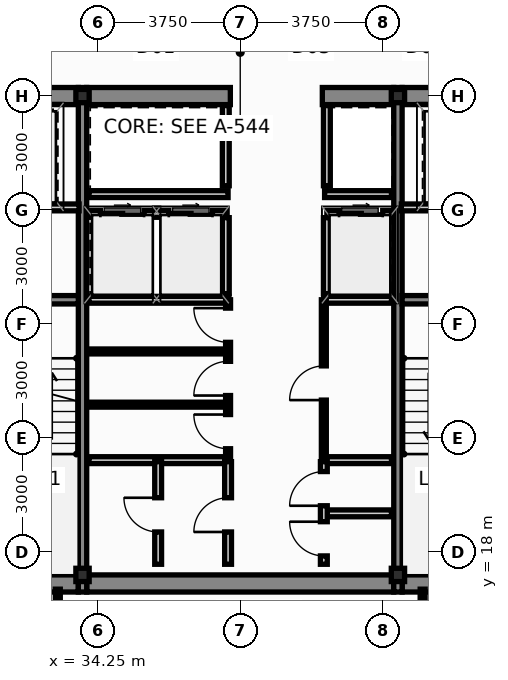
"""IFC4 building model, lengths in metres.
Left out: names, types, materials, properties, quantities, classifications, styles, units other than length and angle.
Written with IfcOpenShell. Run it as: python <this file> out.ifc"""

import sys

from ifc_helpers import new_model, si_unit, direction, frame, frame_2d, origin, origin_2d, place, context, subcontext, project, spatial, rectangle, hollow_rectangle, extrude, source, transform, mapped, element, fill, save


model = new_model("IFC4")
c1 = context("Model", 3, precision=1e-05, world=origin(), true_north=direction((0.0, 1.0)))
c2 = subcontext(c1, "Body", "Model", "MODEL_VIEW")
j1 = project(units=[si_unit("LENGTHUNIT", "METRE"), si_unit("PLANEANGLEUNIT", "RADIAN")], contexts=[c1])
p1 = place(None, origin())
s1 = spatial("IfcSite", under=j1, at=p1, CompositionType="ELEMENT")
p2 = place(p1, origin())
s2 = spatial("IfcBuilding", under=s1, at=p2, CompositionType="ELEMENT")
p3 = place(p2, frame((0.0, 0.0, 205.95)))
s3 = spatial("IfcBuildingStorey", under=s2, at=p3, CompositionType="ELEMENT", Elevation=205.95)
m1 = source(origin(), c2, "Body", "SweptSolid", [
    extrude(hollow_rectangle(XDim=0.35, YDim=0.35, WallThickness=0.016, at=origin_2d()), origin(), (0.0, 0.0, 1.0), 3.65),
])
for number, where, z_axis, x_axis in (
    (1, (33.85, 17.4, 0.0), (0.0, 0.0, 1.0), (1.0, 0.0, 0.0)),
    (2, (42.15, 17.4, 0.0), (0.0, 0.0, 1.0), (1.0, 0.0, 0.0)),
    (3, (33.85, 30.0, 0.0), (0.0, 0.0, 1.0), (1.0, 0.0, 0.0)),
    (4, (42.15, 30.0, 0.0), (0.0, 0.0, 1.0), (1.0, 0.0, 0.0)),
):
    element("IfcColumn", number, at=place(p3, frame(where, z_axis=z_axis, x_axis=x_axis)), inside=s3, PredefinedType="COLUMN", context=c2, shape_type="MappedRepresentation", body=[
        mapped(m1, transform((0.0, 0.0, 0.0), scale=1.0)),
    ])
p4 = place(p3, frame((30.84, 17.175, 0.0), z_axis=(0.0, 0.0, 1.0), x_axis=(1.0, 0.0, 0.0)))
e5 = element("IfcWall", 5, at=p4, inside=s3, PredefinedType="SHEAR", context=c2, shape_type="SweptSolid", body=[
    extrude(rectangle(XDim=2.9, YDim=0.45, at=frame_2d((1.45, 0.0))), origin(), (0.0, 0.0, 1.0), 3.65),
])
p5 = place(p3, frame((33.96, 17.175, 0.0), z_axis=(0.0, 0.0, 1.0), x_axis=(1.0, 0.0, 0.0)))
e6 = element("IfcWall", 6, at=p5, inside=s3, PredefinedType="SHEAR", context=c2, shape_type="SweptSolid", body=[
    extrude(rectangle(XDim=8.08, YDim=0.45, at=frame_2d((4.04, 0.0))), origin(), (0.0, 0.0, 1.0), 3.65),
])
for number, where, z_axis, x_axis in (
    (7, (42.26, 17.175, 0.0), (0.0, 0.0, 1.0), (1.0, 0.0, 0.0)),
    (8, (30.84, 30.0, 0.0), (0.0, 0.0, 1.0), (1.0, 0.0, 0.0)),
):
    element("IfcWall", number, at=place(p3, frame(where, z_axis=z_axis, x_axis=x_axis)), inside=s3, PredefinedType="SHEAR", context=c2, shape_type="SweptSolid", body=[
        extrude(rectangle(XDim=2.9, YDim=0.45, at=frame_2d((1.45, 0.0))), origin(), (0.0, 0.0, 1.0), 3.65),
    ])
p6 = place(p3, frame((33.96, 30.0, 0.0), z_axis=(0.0, 0.0, 1.0), x_axis=(1.0, 0.0, 0.0)))
e9 = element("IfcWall", 9, at=p6, inside=s3, PredefinedType="SHEAR", context=c2, shape_type="SweptSolid", body=[
    extrude(rectangle(XDim=3.78, YDim=0.45, at=frame_2d((1.89, 0.0))), origin(), (0.0, 0.0, 1.0), 3.65),
])
p7 = place(p3, frame((40.16, 30.0, 0.0), z_axis=(0.0, 0.0, 1.0), x_axis=(1.0, 0.0, 0.0)))
e10 = element("IfcWall", 10, at=p7, inside=s3, PredefinedType="SHEAR", context=c2, shape_type="SweptSolid", body=[
    extrude(rectangle(XDim=1.88, YDim=0.45, at=frame_2d((0.94, 0.0))), origin(), (0.0, 0.0, 1.0), 3.65),
])
p8 = place(p3, frame((42.26, 30.0, 0.0), z_axis=(0.0, 0.0, 1.0), x_axis=(1.0, 0.0, 0.0)))
e11 = element("IfcWall", 11, at=p8, inside=s3, PredefinedType="SHEAR", context=c2, shape_type="SweptSolid", body=[
    extrude(rectangle(XDim=2.9, YDim=0.45, at=frame_2d((1.45, 0.0))), origin(), (0.0, 0.0, 1.0), 3.65),
])
for number, where, z_axis, x_axis in (
    (12, (33.85, 16.95, 0.0), (0.0, 0.0, 1.0), (0.0, 1.0, 0.0)),
    (13, (42.15, 16.95, 0.0), (0.0, 0.0, 1.0), (0.0, 1.0, 0.0)),
):
    element("IfcWall", number, at=place(p3, frame(where, z_axis=z_axis, x_axis=x_axis)), inside=s3, PredefinedType="SHEAR", context=c2, shape_type="SweptSolid", body=[
        extrude(rectangle(XDim=13.275, YDim=0.22, at=frame_2d((6.638, 0.0))), origin(), (0.0, 0.0, 1.0), 3.65),
    ])
for number, where, z_axis, x_axis in (
    (14, (30.84, 24.64, 0.0), (0.0, 0.0, 1.0), (1.0, 0.0, 0.0)),
    (15, (42.26, 24.64, 0.0), (0.0, 0.0, 1.0), (1.0, 0.0, 0.0)),
):
    element("IfcWall", number, at=place(p3, frame(where, z_axis=z_axis, x_axis=x_axis)), inside=s3, PredefinedType="SHEAR", context=c2, shape_type="SweptSolid", body=[
        extrude(rectangle(XDim=2.9, YDim=0.22, at=frame_2d((1.45, 0.0))), origin(), (0.0, 0.0, 1.0), 3.65),
    ])
p9 = place(p3, frame((34.02, 26.9, 0.0), z_axis=(0.0, 0.0, 1.0), x_axis=(1.0, 0.0, 0.0)))
e16 = element("IfcWall", 16, at=p9, inside=s3, PredefinedType="PARTITIONING", context=c2, shape_type="SweptSolid", body=[
    extrude(rectangle(XDim=3.6, YDim=0.18, at=frame_2d((1.8, 0.0))), origin(), (0.0, 0.0, 1.0), 3.4),
])
p10 = place(p9, frame((0.3, 0.0, 0.0)))
e17 = element("IfcOpeningElement", 17, at=p10, cuts=e16, PredefinedType="OPENING", context=c2, shape_type="SweptSolid", body=[
    extrude(rectangle(XDim=1.15, YDim=2.2, at=frame_2d((0.575, 1.1))), frame((0.0, 0.102, 0.0), z_axis=(0.0, -1.0, 0.0), x_axis=(1.0, 0.0, 0.0)), (0.0, 0.0, 1.0), 0.204),
])
p11 = place(p9, frame((2.1, 0.0, 0.0)))
e18 = element("IfcOpeningElement", 18, at=p11, cuts=e16, PredefinedType="OPENING", context=c2, shape_type="SweptSolid", body=[
    extrude(rectangle(XDim=1.15, YDim=2.2, at=frame_2d((0.575, 1.1))), frame((0.0, 0.102, 0.0), z_axis=(0.0, -1.0, 0.0), x_axis=(1.0, 0.0, 0.0)), (0.0, 0.0, 1.0), 0.204),
])
p12 = place(p3, frame((40.28, 26.9, 0.0), z_axis=(0.0, 0.0, 1.0), x_axis=(1.0, 0.0, 0.0)))
e19 = element("IfcWall", 19, at=p12, inside=s3, PredefinedType="PARTITIONING", context=c2, shape_type="SweptSolid", body=[
    extrude(rectangle(XDim=1.7, YDim=0.18, at=frame_2d((0.85, 0.0))), origin(), (0.0, 0.0, 1.0), 3.4),
])
p13 = place(p12, frame((0.32, 0.0, 0.0)))
e20 = element("IfcOpeningElement", 20, at=p13, cuts=e19, PredefinedType="OPENING", context=c2, shape_type="SweptSolid", body=[
    extrude(rectangle(XDim=1.15, YDim=2.2, at=frame_2d((0.575, 1.1))), frame((0.0, 0.102, 0.0), z_axis=(0.0, -1.0, 0.0), x_axis=(1.0, 0.0, 0.0)), (0.0, 0.0, 1.0), 0.204),
])
for number, where, z_axis, x_axis in (
    (21, (37.62, 24.8, 0.0), (0.0, 0.0, 1.0), (0.0, 1.0, 0.0)),
    (22, (40.28, 24.8, 0.0), (0.0, 0.0, 1.0), (0.0, 1.0, 0.0)),
):
    element("IfcWall", number, at=place(p3, frame(where, z_axis=z_axis, x_axis=x_axis)), inside=s3, PredefinedType="PARTITIONING", context=c2, shape_type="SweptSolid", body=[
        extrude(rectangle(XDim=2.0, YDim=0.18, at=frame_2d((1.0, 0.0))), origin(), (0.0, 0.0, 1.0), 3.4),
    ])
p14 = place(p3, frame((34.02, 24.64, 0.0), z_axis=(0.0, 0.0, 1.0), x_axis=(1.0, 0.0, 0.0)))
e23 = element("IfcWall", 23, at=p14, inside=s3, PredefinedType="PARTITIONING", context=c2, shape_type="SweptSolid", body=[
    extrude(rectangle(XDim=3.68, YDim=0.18, at=frame_2d((1.84, 0.0))), origin(), (0.0, 0.0, 1.0), 3.4),
])
p15 = place(p3, frame((40.2, 24.64, 0.0), z_axis=(0.0, 0.0, 1.0), x_axis=(1.0, 0.0, 0.0)))
e24 = element("IfcWall", 24, at=p15, inside=s3, PredefinedType="PARTITIONING", context=c2, shape_type="SweptSolid", body=[
    extrude(rectangle(XDim=1.78, YDim=0.18, at=frame_2d((0.89, 0.0))), origin(), (0.0, 0.0, 1.0), 3.4),
])
p16 = place(p3, frame((34.02, 27.42, 0.0), z_axis=(0.0, 0.0, 1.0), x_axis=(1.0, 0.0, 0.0)))
e25 = element("IfcWall", 25, at=p16, inside=s3, PredefinedType="PARTITIONING", context=c2, shape_type="SweptSolid", body=[
    extrude(rectangle(XDim=3.66, YDim=0.18, at=frame_2d((1.83, 0.0))), origin(), (0.0, 0.0, 1.0), 3.4),
])
p17 = place(p3, frame((40.22, 27.42, 0.0), z_axis=(0.0, 0.0, 1.0), x_axis=(1.0, 0.0, 0.0)))
e26 = element("IfcWall", 26, at=p17, inside=s3, PredefinedType="PARTITIONING", context=c2, shape_type="SweptSolid", body=[
    extrude(rectangle(XDim=1.76, YDim=0.18, at=frame_2d((0.88, 0.0))), origin(), (0.0, 0.0, 1.0), 3.4),
])
for number, where, z_axis, x_axis in (
    (27, (37.62, 27.64, 0.0), (0.0, 0.0, 1.0), (0.0, 1.0, 0.0)),
    (28, (40.28, 27.64, 0.0), (0.0, 0.0, 1.0), (0.0, 1.0, 0.0)),
):
    element("IfcWall", number, at=place(p3, frame(where, z_axis=z_axis, x_axis=x_axis)), inside=s3, PredefinedType="PARTITIONING", context=c2, shape_type="SweptSolid", body=[
        extrude(rectangle(XDim=2.11, YDim=0.18, at=frame_2d((1.055, 0.0))), origin(), (0.0, 0.0, 1.0), 3.4),
    ])
for number, where, z_axis, x_axis in (
    (29, (30.86, 27.07, 0.0), (0.0, 0.0, 1.0), (1.0, 0.0, 0.0)),
    (30, (42.24, 27.07, 0.0), (0.0, 0.0, 1.0), (1.0, 0.0, 0.0)),
):
    element("IfcWall", number, at=place(p3, frame(where, z_axis=z_axis, x_axis=x_axis)), inside=s3, PredefinedType="PARTITIONING", context=c2, shape_type="SweptSolid", body=[
        extrude(rectangle(XDim=2.9, YDim=0.18, at=frame_2d((1.45, 0.0))), origin(), (0.0, 0.0, 1.0), 3.4),
    ])
p18 = place(p3, frame((34.02, 20.42, 0.0), z_axis=(0.0, 0.0, 1.0), x_axis=(1.0, 0.0, 0.0)))
e31 = element("IfcWall", 31, at=p18, inside=s3, PredefinedType="PARTITIONING", context=c2, shape_type="SweptSolid", body=[
    extrude(rectangle(XDim=3.64, YDim=0.18, at=frame_2d((1.82, 0.0))), origin(), (0.0, 0.0, 1.0), 3.4),
])
p19 = place(p3, frame((40.22, 20.42, 0.0), z_axis=(0.0, 0.0, 1.0), x_axis=(1.0, 0.0, 0.0)))
e32 = element("IfcWall", 32, at=p19, inside=s3, PredefinedType="PARTITIONING", context=c2, shape_type="SweptSolid", body=[
    extrude(rectangle(XDim=1.76, YDim=0.18, at=frame_2d((0.88, 0.0))), origin(), (0.0, 0.0, 1.0), 3.4),
])
for number, where, z_axis, x_axis in (
    (33, (34.02, 21.88, 0.0), (0.0, 0.0, 1.0), (1.0, 0.0, 0.0)),
    (34, (34.02, 23.28, 0.0), (0.0, 0.0, 1.0), (1.0, 0.0, 0.0)),
):
    element("IfcWall", number, at=place(p3, frame(where, z_axis=z_axis, x_axis=x_axis)), inside=s3, PredefinedType="PARTITIONING", context=c2, shape_type="SweptSolid", body=[
        extrude(rectangle(XDim=3.58, YDim=0.13, at=frame_2d((1.79, 0.0))), origin(), (0.0, 0.0, 1.0), 3.4),
    ])
p20 = place(p3, frame((37.68, 20.5, 0.0), z_axis=(0.0, 0.0, 1.0), x_axis=(0.0, 1.0, 0.0)))
e35 = element("IfcWall", 35, at=p20, inside=s3, PredefinedType="PARTITIONING", context=c2, shape_type="SweptSolid", body=[
    extrude(rectangle(XDim=4.14, YDim=0.13, at=frame_2d((2.07, 0.0))), origin(), (0.0, 0.0, 1.0), 3.4),
])
p21 = place(p20, frame((0.22, 0.0, 0.0)))
e36 = element("IfcOpeningElement", 36, at=p21, cuts=e35, PredefinedType="OPENING", context=c2, shape_type="SweptSolid", body=[
    extrude(rectangle(XDim=0.9, YDim=2.1, at=frame_2d((0.45, 1.05))), frame((0.0, 0.077, 0.0), z_axis=(0.0, -1.0, 0.0), x_axis=(1.0, 0.0, 0.0)), (0.0, 0.0, 1.0), 0.154),
])
p22 = place(p20, frame((1.62, 0.0, 0.0)))
e37 = element("IfcOpeningElement", 37, at=p22, cuts=e35, PredefinedType="OPENING", context=c2, shape_type="SweptSolid", body=[
    extrude(rectangle(XDim=0.9, YDim=2.1, at=frame_2d((0.45, 1.05))), frame((0.0, 0.077, 0.0), z_axis=(0.0, -1.0, 0.0), x_axis=(1.0, 0.0, 0.0)), (0.0, 0.0, 1.0), 0.154),
])
p23 = place(p20, frame((3.02, 0.0, 0.0)))
e38 = element("IfcOpeningElement", 38, at=p23, cuts=e35, PredefinedType="OPENING", context=c2, shape_type="SweptSolid", body=[
    extrude(rectangle(XDim=0.9, YDim=2.1, at=frame_2d((0.45, 1.05))), frame((0.0, 0.077, 0.0), z_axis=(0.0, -1.0, 0.0), x_axis=(1.0, 0.0, 0.0)), (0.0, 0.0, 1.0), 0.154),
])
p24 = place(p3, frame((40.2, 20.5, 0.0), z_axis=(0.0, 0.0, 1.0), x_axis=(0.0, 1.0, 0.0)))
e39 = element("IfcWall", 39, at=p24, inside=s3, PredefinedType="PARTITIONING", context=c2, shape_type="SweptSolid", body=[
    extrude(rectangle(XDim=4.14, YDim=0.13, at=frame_2d((2.07, 0.0))), origin(), (0.0, 0.0, 1.0), 3.4),
])
p25 = place(p24, frame((1.5, 0.0, 0.0)))
e40 = element("IfcOpeningElement", 40, at=p25, cuts=e39, PredefinedType="OPENING", context=c2, shape_type="SweptSolid", body=[
    extrude(rectangle(XDim=0.9, YDim=2.1, at=frame_2d((0.45, 1.05))), frame((0.0, 0.077, 0.0), z_axis=(0.0, -1.0, 0.0), x_axis=(1.0, 0.0, 0.0)), (0.0, 0.0, 1.0), 0.154),
])
p26 = place(p3, frame((35.84, 17.68, 0.0), z_axis=(0.0, 0.0, 1.0), x_axis=(0.0, 1.0, 0.0)))
e41 = element("IfcWall", 41, at=p26, inside=s3, PredefinedType="PARTITIONING", context=c2, shape_type="SweptSolid", body=[
    extrude(rectangle(XDim=2.7, YDim=0.18, at=frame_2d((1.35, 0.0))), origin(), (0.0, 0.0, 1.0), 3.4),
])
p27 = place(p26, frame((0.85, 0.0, 0.0)))
e42 = element("IfcOpeningElement", 42, at=p27, cuts=e41, PredefinedType="OPENING", context=c2, shape_type="SweptSolid", body=[
    extrude(rectangle(XDim=0.9, YDim=2.1, at=frame_2d((0.45, 1.05))), frame((0.0, 0.102, 0.0), z_axis=(0.0, -1.0, 0.0), x_axis=(1.0, 0.0, 0.0)), (0.0, 0.0, 1.0), 0.204),
])
p28 = place(p3, frame((37.68, 17.68, 0.0), z_axis=(0.0, 0.0, 1.0), x_axis=(0.0, 1.0, 0.0)))
e43 = element("IfcWall", 43, at=p28, inside=s3, PredefinedType="PARTITIONING", context=c2, shape_type="SweptSolid", body=[
    extrude(rectangle(XDim=2.7, YDim=0.18, at=frame_2d((1.35, 0.0))), origin(), (0.0, 0.0, 1.0), 3.4),
])
p29 = place(p28, frame((0.85, 0.0, 0.0)))
e44 = element("IfcOpeningElement", 44, at=p29, cuts=e43, PredefinedType="OPENING", context=c2, shape_type="SweptSolid", body=[
    extrude(rectangle(XDim=0.9, YDim=2.1, at=frame_2d((0.45, 1.05))), frame((0.0, 0.102, 0.0), z_axis=(0.0, -1.0, 0.0), x_axis=(1.0, 0.0, 0.0)), (0.0, 0.0, 1.0), 0.204),
])
p30 = place(p3, frame((40.28, 19.02, 0.0), z_axis=(0.0, 0.0, 1.0), x_axis=(1.0, 0.0, 0.0)))
e45 = element("IfcWall", 45, at=p30, inside=s3, PredefinedType="PARTITIONING", context=c2, shape_type="SweptSolid", body=[
    extrude(rectangle(XDim=1.7, YDim=0.18, at=frame_2d((0.85, 0.0))), origin(), (0.0, 0.0, 1.0), 3.4),
])
p31 = place(p3, frame((40.2, 17.68, 0.0), z_axis=(0.0, 0.0, 1.0), x_axis=(0.0, 1.0, 0.0)))
e46 = element("IfcWall", 46, at=p31, inside=s3, PredefinedType="PARTITIONING", context=c2, shape_type="SweptSolid", body=[
    extrude(rectangle(XDim=2.7, YDim=0.18, at=frame_2d((1.35, 0.0))), origin(), (0.0, 0.0, 1.0), 3.4),
])
p32 = place(p31, frame((0.22, 0.0, 0.0)))
e47 = element("IfcOpeningElement", 47, at=p32, cuts=e46, PredefinedType="OPENING", context=c2, shape_type="SweptSolid", body=[
    extrude(rectangle(XDim=0.9, YDim=2.1, at=frame_2d((0.45, 1.05))), frame((0.0, 0.102, 0.0), z_axis=(0.0, -1.0, 0.0), x_axis=(1.0, 0.0, 0.0)), (0.0, 0.0, 1.0), 0.204),
])
p33 = place(p31, frame((1.54, 0.0, 0.0)))
e48 = element("IfcOpeningElement", 48, at=p33, cuts=e46, PredefinedType="OPENING", context=c2, shape_type="SweptSolid", body=[
    extrude(rectangle(XDim=0.9, YDim=2.1, at=frame_2d((0.45, 1.05))), frame((0.0, 0.102, 0.0), z_axis=(0.0, -1.0, 0.0), x_axis=(1.0, 0.0, 0.0)), (0.0, 0.0, 1.0), 0.204),
])
p34 = place(p3, frame((33.2, 14.375, 0.0), z_axis=(0.0, 0.0, 1.0), x_axis=(0.0, 1.0, 0.0)))
e49 = element("IfcWall", 49, at=p34, inside=s3, PredefinedType="PARTITIONING", context=c2, shape_type="SweptSolid", body=[
    extrude(rectangle(XDim=2.65, YDim=0.13, at=frame_2d((1.325, 0.0))), origin(), (0.0, 0.0, 1.0), 3.4),
])
p35 = place(p34, frame((0.845, 0.0, 0.0)))
e50 = element("IfcOpeningElement", 50, at=p35, cuts=e49, PredefinedType="OPENING", context=c2, shape_type="SweptSolid", body=[
    extrude(rectangle(XDim=0.96, YDim=2.15, at=frame_2d((0.48, 1.075))), frame((0.0, 0.077, 0.0), z_axis=(0.0, -1.0, 0.0), x_axis=(1.0, 0.0, 0.0)), (0.0, 0.0, 1.0), 0.154),
])
p36 = place(p3, frame((42.8, 14.375, 0.0), z_axis=(0.0, 0.0, 1.0), x_axis=(0.0, 1.0, 0.0)))
e51 = element("IfcWall", 51, at=p36, inside=s3, PredefinedType="PARTITIONING", context=c2, shape_type="SweptSolid", body=[
    extrude(rectangle(XDim=2.65, YDim=0.13, at=frame_2d((1.325, 0.0))), origin(), (0.0, 0.0, 1.0), 3.4),
])
p37 = place(p10, origin())
e52 = element("IfcDoor", 52, at=p37, inside=s3, OperationType="SLIDING_TO_LEFT", PredefinedType="DOOR", context=c2, shape_type="SweptSolid", body=[
    extrude(rectangle(XDim=1.15, YDim=2.2, at=frame_2d((0.575, 1.1))), frame((0.0, 0.025, 0.0), z_axis=(0.0, -1.0, 0.0), x_axis=(1.0, 0.0, 0.0)), (0.0, 0.0, 1.0), 0.05),
])
fill(e17, e52)
p38 = place(p11, origin())
e53 = element("IfcDoor", 53, at=p38, inside=s3, OperationType="SLIDING_TO_RIGHT", PredefinedType="DOOR", context=c2, shape_type="SweptSolid", body=[
    extrude(rectangle(XDim=1.15, YDim=2.2, at=frame_2d((0.575, 1.1))), frame((0.0, 0.025, 0.0), z_axis=(0.0, -1.0, 0.0), x_axis=(1.0, 0.0, 0.0)), (0.0, 0.0, 1.0), 0.05),
])
fill(e18, e53)
p39 = place(p13, origin())
e54 = element("IfcDoor", 54, at=p39, inside=s3, OperationType="SLIDING_TO_LEFT", PredefinedType="DOOR", context=c2, shape_type="SweptSolid", body=[
    extrude(rectangle(XDim=1.15, YDim=2.2, at=frame_2d((0.575, 1.1))), frame((0.0, 0.025, 0.0), z_axis=(0.0, -1.0, 0.0), x_axis=(1.0, 0.0, 0.0)), (0.0, 0.0, 1.0), 0.05),
])
fill(e20, e54)
p40 = place(p21, origin())
e55 = element("IfcDoor", 55, at=p40, inside=s3, OperationType="SINGLE_SWING_RIGHT", PredefinedType="DOOR", context=c2, shape_type="SweptSolid", body=[
    extrude(rectangle(XDim=0.9, YDim=2.1, at=frame_2d((0.45, 1.05))), frame((0.0, 0.025, 0.0), z_axis=(0.0, -1.0, 0.0), x_axis=(1.0, 0.0, 0.0)), (0.0, 0.0, 1.0), 0.05),
])
fill(e36, e55)
p41 = place(p22, origin())
e56 = element("IfcDoor", 56, at=p41, inside=s3, OperationType="SINGLE_SWING_LEFT", PredefinedType="DOOR", context=c2, shape_type="SweptSolid", body=[
    extrude(rectangle(XDim=0.9, YDim=2.1, at=frame_2d((0.45, 1.05))), frame((0.0, 0.025, 0.0), z_axis=(0.0, -1.0, 0.0), x_axis=(1.0, 0.0, 0.0)), (0.0, 0.0, 1.0), 0.05),
])
fill(e37, e56)
p42 = place(p23, origin())
e57 = element("IfcDoor", 57, at=p42, inside=s3, OperationType="SINGLE_SWING_RIGHT", PredefinedType="DOOR", context=c2, shape_type="SweptSolid", body=[
    extrude(rectangle(XDim=0.9, YDim=2.1, at=frame_2d((0.45, 1.05))), frame((0.0, 0.025, 0.0), z_axis=(0.0, -1.0, 0.0), x_axis=(1.0, 0.0, 0.0)), (0.0, 0.0, 1.0), 0.05),
])
fill(e38, e57)
p43 = place(p25, origin())
e58 = element("IfcDoor", 58, at=p43, inside=s3, OperationType="SINGLE_SWING_LEFT", PredefinedType="DOOR", context=c2, shape_type="SweptSolid", body=[
    extrude(rectangle(XDim=0.9, YDim=2.1, at=frame_2d((0.45, 1.05))), frame((0.0, 0.025, 0.0), z_axis=(0.0, -1.0, 0.0), x_axis=(1.0, 0.0, 0.0)), (0.0, 0.0, 1.0), 0.05),
])
fill(e40, e58)
p44 = place(p27, origin())
e59 = element("IfcDoor", 59, at=p44, inside=s3, OperationType="SINGLE_SWING_RIGHT", PredefinedType="DOOR", context=c2, shape_type="SweptSolid", body=[
    extrude(rectangle(XDim=0.9, YDim=2.1, at=frame_2d((0.45, 1.05))), frame((0.0, 0.025, 0.0), z_axis=(0.0, -1.0, 0.0), x_axis=(1.0, 0.0, 0.0)), (0.0, 0.0, 1.0), 0.05),
])
fill(e42, e59)
p45 = place(p29, origin())
e60 = element("IfcDoor", 60, at=p45, inside=s3, OperationType="SINGLE_SWING_LEFT", PredefinedType="DOOR", context=c2, shape_type="SweptSolid", body=[
    extrude(rectangle(XDim=0.9, YDim=2.1, at=frame_2d((0.45, 1.05))), frame((0.0, 0.025, 0.0), z_axis=(0.0, -1.0, 0.0), x_axis=(1.0, 0.0, 0.0)), (0.0, 0.0, 1.0), 0.05),
])
fill(e44, e60)
p46 = place(p32, origin())
e61 = element("IfcDoor", 61, at=p46, inside=s3, OperationType="SINGLE_SWING_RIGHT", PredefinedType="DOOR", context=c2, shape_type="SweptSolid", body=[
    extrude(rectangle(XDim=0.9, YDim=2.1, at=frame_2d((0.45, 1.05))), frame((0.0, 0.025, 0.0), z_axis=(0.0, -1.0, 0.0), x_axis=(1.0, 0.0, 0.0)), (0.0, 0.0, 1.0), 0.05),
])
fill(e47, e61)
p47 = place(p33, origin())
e62 = element("IfcDoor", 62, at=p47, inside=s3, OperationType="SINGLE_SWING_LEFT", PredefinedType="DOOR", context=c2, shape_type="SweptSolid", body=[
    extrude(rectangle(XDim=0.9, YDim=2.1, at=frame_2d((0.45, 1.05))), frame((0.0, 0.025, 0.0), z_axis=(0.0, -1.0, 0.0), x_axis=(1.0, 0.0, 0.0)), (0.0, 0.0, 1.0), 0.05),
])
fill(e48, e62)
save(model, sys.argv[1])
